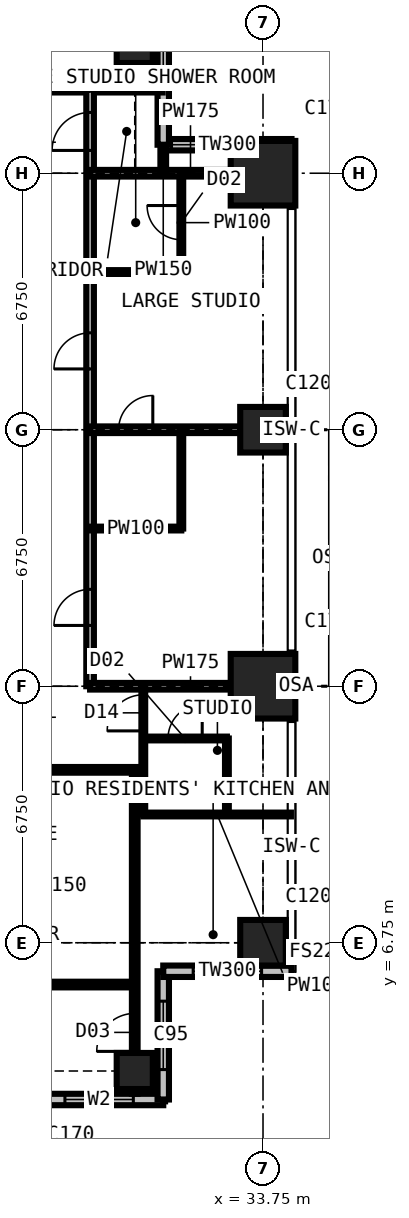
"""IFC4 building model, lengths in metres.
Left out: names, types, materials, properties, quantities, classifications, styles, units other than length and angle.
Written with IfcOpenShell. Run it as: python <this file> out.ifc"""

import sys

from ifc_helpers import new_model, si_unit, direction, frame, frame_2d, origin, origin_2d, place, context, subcontext, project, spatial, rectangle, extrude, element, fill, save


model = new_model("IFC4")
c1 = context("Model", 3, precision=1e-05, world=origin(), true_north=direction((0.0, 1.0)))
c2 = subcontext(c1, "Body", "Model", "MODEL_VIEW")
j1 = project(units=[si_unit("LENGTHUNIT", "METRE"), si_unit("PLANEANGLEUNIT", "RADIAN")], contexts=[c1])
p1 = place(None, origin())
s1 = spatial("IfcSite", under=j1, at=p1, CompositionType="ELEMENT")
p2 = place(p1, origin())
s2 = spatial("IfcBuilding", under=s1, at=p2, CompositionType="ELEMENT")
p3 = place(p2, frame((0.0, 0.0, 196.2)))
s3 = spatial("IfcBuildingStorey", under=s2, at=p3, CompositionType="ELEMENT", Elevation=196.2)
for number, where, z_axis, x_axis in (
    (1, (30.375, 3.375, 0.0), (0.0, 0.0, 1.0), (1.0, 0.0, 0.0)),
    (2, (30.375, 30.375, 0.0), (0.0, 0.0, 1.0), (1.0, 0.0, 0.0)),
):
    element("IfcColumn", number, at=place(p3, frame(where, z_axis=z_axis, x_axis=x_axis)), inside=s3, PredefinedType="COLUMN", context=c2, shape_type="SweptSolid", body=[
        extrude(rectangle(XDim=0.95, YDim=0.95, at=origin_2d()), origin(), (0.0, 0.0, 1.0), 3.6),
    ])
p4 = place(p3, frame((33.75, 6.75, 0.0), z_axis=(0.0, 0.0, 1.0), x_axis=(1.0, 0.0, 0.0)))
e3 = element("IfcColumn", 3, at=p4, inside=s3, PredefinedType="COLUMN", context=c2, shape_type="SweptSolid", body=[
    extrude(rectangle(XDim=1.2, YDim=1.2, at=origin_2d()), origin(), (0.0, 0.0, 1.0), 3.6),
])
p5 = place(p3, frame((33.75, 13.5, 0.0), z_axis=(0.0, 0.0, 1.0), x_axis=(1.0, 0.0, 0.0)))
e4 = element("IfcColumn", 4, at=p5, inside=s3, PredefinedType="COLUMN", context=c2, shape_type="SweptSolid", body=[
    extrude(rectangle(XDim=1.7, YDim=1.7, at=origin_2d()), origin(), (0.0, 0.0, 1.0), 3.6),
])
p6 = place(p3, frame((33.75, 20.25, 0.0), z_axis=(0.0, 0.0, 1.0), x_axis=(1.0, 0.0, 0.0)))
e5 = element("IfcColumn", 5, at=p6, inside=s3, PredefinedType="COLUMN", context=c2, shape_type="SweptSolid", body=[
    extrude(rectangle(XDim=1.2, YDim=1.2, at=origin_2d()), origin(), (0.0, 0.0, 1.0), 3.6),
])
p7 = place(p3, frame((33.75, 27.0, 0.0), z_axis=(0.0, 0.0, 1.0), x_axis=(1.0, 0.0, 0.0)))
e6 = element("IfcColumn", 6, at=p7, inside=s3, PredefinedType="COLUMN", context=c2, shape_type="SweptSolid", body=[
    extrude(rectangle(XDim=1.7, YDim=1.7, at=origin_2d()), origin(), (0.0, 0.0, 1.0), 3.6),
])
p8 = place(p3, frame((34.5, 27.75, 0.0), z_axis=(0.0, 0.0, 1.0), x_axis=(-1.0, 0.0, 0.0)))
e7 = element("IfcWall", 7, at=p8, inside=s3, PredefinedType="SOLIDWALL", context=c2, shape_type="SweptSolid", body=[
    extrude(rectangle(XDim=3.375, YDim=0.3, at=frame_2d((1.688, 0.0))), origin(), (0.0, 0.0, 1.0), 3.3),
])
p9 = place(p8, frame((1.657, 0.0, 0.9)))
e8 = element("IfcOpeningElement", 8, at=p9, cuts=e7, PredefinedType="OPENING", context=c2, shape_type="SweptSolid", body=[
    extrude(rectangle(XDim=1.5, YDim=1.8, at=frame_2d((0.75, 0.9))), frame((0.0, 0.16, 0.0), z_axis=(0.0, -1.0, 0.0), x_axis=(1.0, 0.0, 0.0)), (0.0, 0.0, 1.0), 0.32),
])
p10 = place(p3, frame((31.125, 27.75, 0.0), z_axis=(0.0, 0.0, 1.0), x_axis=(0.0, 1.0, 0.0)))
e9 = element("IfcWall", 9, at=p10, inside=s3, PredefinedType="SOLIDWALL", context=c2, shape_type="SweptSolid", body=[
    extrude(rectangle(XDim=3.375, YDim=0.3, at=frame_2d((1.688, 0.0))), origin(), (0.0, 0.0, 1.0), 3.3),
])
p11 = place(p10, frame((1.663, 0.0, 0.9)))
e10 = element("IfcOpeningElement", 10, at=p11, cuts=e9, PredefinedType="OPENING", context=c2, shape_type="SweptSolid", body=[
    extrude(rectangle(XDim=1.5, YDim=1.8, at=frame_2d((0.75, 0.9))), frame((0.0, 0.16, 0.0), z_axis=(0.0, -1.0, 0.0), x_axis=(1.0, 0.0, 0.0)), (0.0, 0.0, 1.0), 0.32),
])
p12 = place(p3, frame((27.75, 2.625, 0.0), z_axis=(0.0, 0.0, 1.0), x_axis=(1.0, 0.0, 0.0)))
e11 = element("IfcWall", 11, at=p12, inside=s3, PredefinedType="SOLIDWALL", context=c2, shape_type="SweptSolid", body=[
    extrude(rectangle(XDim=3.375, YDim=0.3, at=frame_2d((1.688, 0.0))), origin(), (0.0, 0.0, 1.0), 3.3),
])
p13 = place(p12, frame((0.788, 0.0, 0.6)))
e12 = element("IfcOpeningElement", 12, at=p13, cuts=e11, PredefinedType="OPENING", context=c2, shape_type="SweptSolid", body=[
    extrude(rectangle(XDim=1.8, YDim=2.1, at=frame_2d((0.9, 1.05))), frame((0.0, 0.16, 0.0), z_axis=(0.0, -1.0, 0.0), x_axis=(1.0, 0.0, 0.0)), (0.0, 0.0, 1.0), 0.32),
])
p14 = place(p3, frame((31.125, 2.625, 0.0), z_axis=(0.0, 0.0, 1.0), x_axis=(0.0, 1.0, 0.0)))
e13 = element("IfcWall", 13, at=p14, inside=s3, PredefinedType="SOLIDWALL", context=c2, shape_type="SweptSolid", body=[
    extrude(rectangle(XDim=3.375, YDim=0.3, at=frame_2d((1.688, 0.0))), origin(), (0.0, 0.0, 1.0), 3.3),
])
p15 = place(p14, frame((0.788, 0.0, 0.6)))
e14 = element("IfcOpeningElement", 14, at=p15, cuts=e13, PredefinedType="OPENING", context=c2, shape_type="SweptSolid", body=[
    extrude(rectangle(XDim=1.8, YDim=2.1, at=frame_2d((0.9, 1.05))), frame((0.0, 0.16, 0.0), z_axis=(0.0, -1.0, 0.0), x_axis=(1.0, 0.0, 0.0)), (0.0, 0.0, 1.0), 0.32),
])
p16 = place(p3, frame((31.125, 6.0, 0.0), z_axis=(0.0, 0.0, 1.0), x_axis=(1.0, 0.0, 0.0)))
e15 = element("IfcWall", 15, at=p16, inside=s3, PredefinedType="SOLIDWALL", context=c2, shape_type="SweptSolid", body=[
    extrude(rectangle(XDim=3.375, YDim=0.3, at=frame_2d((1.688, 0.0))), origin(), (0.0, 0.0, 1.0), 3.3),
])
p17 = place(p16, frame((0.788, 0.0, 0.6)))
e16 = element("IfcOpeningElement", 16, at=p17, cuts=e15, PredefinedType="OPENING", context=c2, shape_type="SweptSolid", body=[
    extrude(rectangle(XDim=1.8, YDim=2.1, at=frame_2d((0.9, 1.05))), frame((0.0, 0.16, 0.0), z_axis=(0.0, -1.0, 0.0), x_axis=(1.0, 0.0, 0.0)), (0.0, 0.0, 1.0), 0.32),
])
p18 = place(p3, frame((10.125, 11.3, 0.0), z_axis=(0.0, 0.0, 1.0), x_axis=(1.0, 0.0, 0.0)))
e17 = element("IfcWall", 17, at=p18, inside=s3, PredefinedType="PARTITIONING", context=c2, shape_type="SweptSolid", body=[
    extrude(rectangle(XDim=20.475, YDim=0.15, at=frame_2d((10.238, 0.0))), origin(), (0.0, 0.0, 1.0), 3.3),
])
p19 = place(p18, frame((8.425, 0.0, 0.0)))
e18 = element("IfcOpeningElement", 18, at=p19, cuts=e17, PredefinedType="OPENING", context=c2, shape_type="SweptSolid", body=[
    extrude(rectangle(XDim=1.0, YDim=2.2, at=frame_2d((0.5, 1.1))), frame((0.0, 0.085, 0.0), z_axis=(0.0, -1.0, 0.0), x_axis=(1.0, 0.0, 0.0)), (0.0, 0.0, 1.0), 0.17),
])
p20 = place(p18, frame((10.975, 0.0, 0.0)))
e19 = element("IfcOpeningElement", 19, at=p20, cuts=e17, PredefinedType="OPENING", context=c2, shape_type="SweptSolid", body=[
    extrude(rectangle(XDim=1.0, YDim=2.2, at=frame_2d((0.5, 1.1))), frame((0.0, 0.085, 0.0), z_axis=(0.0, -1.0, 0.0), x_axis=(1.0, 0.0, 0.0)), (0.0, 0.0, 1.0), 0.17),
])
p21 = place(p18, frame((4.875, 0.0, 0.0)))
e20 = element("IfcOpeningElement", 20, at=p21, cuts=e17, PredefinedType="OPENING", context=c2, shape_type="SweptSolid", body=[
    extrude(rectangle(XDim=0.95, YDim=2.2, at=frame_2d((0.475, 1.1))), frame((0.0, 0.085, 0.0), z_axis=(0.0, -1.0, 0.0), x_axis=(1.0, 0.0, 0.0)), (0.0, 0.0, 1.0), 0.17),
])
p22 = place(p3, frame((11.3, 29.2, 0.0), z_axis=(0.0, 0.0, 1.0), x_axis=(1.0, 0.0, 0.0)))
e21 = element("IfcWall", 21, at=p22, inside=s3, PredefinedType="PARTITIONING", context=c2, shape_type="SweptSolid", body=[
    extrude(rectangle(XDim=19.809, YDim=0.15, at=frame_2d((9.904, 0.0))), origin(), (0.0, 0.0, 1.0), 3.3),
])
p23 = place(p22, frame((12.9, 0.0, 0.0)))
e22 = element("IfcOpeningElement", 22, at=p23, cuts=e21, PredefinedType="OPENING", context=c2, shape_type="SweptSolid", body=[
    extrude(rectangle(XDim=1.0, YDim=2.2, at=frame_2d((0.5, 1.1))), frame((0.0, 0.085, 0.0), z_axis=(0.0, -1.0, 0.0), x_axis=(1.0, 0.0, 0.0)), (0.0, 0.0, 1.0), 0.17),
])
p24 = place(p22, frame((6.4, 0.0, 0.0)))
e23 = element("IfcOpeningElement", 23, at=p24, cuts=e21, PredefinedType="OPENING", context=c2, shape_type="SweptSolid", body=[
    extrude(rectangle(XDim=0.95, YDim=2.2, at=frame_2d((0.475, 1.1))), frame((0.0, 0.085, 0.0), z_axis=(0.0, -1.0, 0.0), x_axis=(1.0, 0.0, 0.0)), (0.0, 0.0, 1.0), 0.17),
])
p25 = place(p22, frame((0.6, 0.0, 0.0)))
e24 = element("IfcOpeningElement", 24, at=p25, cuts=e21, PredefinedType="OPENING", context=c2, shape_type="SweptSolid", body=[
    extrude(rectangle(XDim=1.0, YDim=2.2, at=frame_2d((0.5, 1.1))), frame((0.0, 0.085, 0.0), z_axis=(0.0, -1.0, 0.0), x_axis=(1.0, 0.0, 0.0)), (0.0, 0.0, 1.0), 0.17),
])
p26 = place(p3, frame((22.988, 5.65, 0.0), z_axis=(0.0, 0.0, 1.0), x_axis=(1.0, 0.0, 0.0)))
e25 = element("IfcWall", 25, at=p26, inside=s3, PredefinedType="PARTITIONING", context=c2, shape_type="SweptSolid", body=[
    extrude(rectangle(XDim=7.387, YDim=0.15, at=frame_2d((3.694, 0.0))), origin(), (0.0, 0.0, 1.0), 3.3),
])
p27 = place(p26, frame((2.3, 0.0, 0.0)))
e26 = element("IfcOpeningElement", 26, at=p27, cuts=e25, PredefinedType="OPENING", context=c2, shape_type="SweptSolid", body=[
    extrude(rectangle(XDim=0.95, YDim=2.2, at=frame_2d((0.475, 1.1))), frame((0.0, 0.085, 0.0), z_axis=(0.0, -1.0, 0.0), x_axis=(1.0, 0.0, 0.0)), (0.0, 0.0, 1.0), 0.17),
])
p28 = place(p3, frame((29.2, 13.5, 0.0), z_axis=(0.0, 0.0, 1.0), x_axis=(0.0, 1.0, 0.0)))
e27 = element("IfcWall", 27, at=p28, inside=s3, PredefinedType="PARTITIONING", context=c2, shape_type="SweptSolid", body=[
    extrude(rectangle(XDim=15.7, YDim=0.2, at=frame_2d((7.85, 0.0))), origin(), (0.0, 0.0, 1.0), 3.3),
])
p29 = place(p28, frame((8.35, 0.0, 0.0)))
e28 = element("IfcOpeningElement", 28, at=p29, cuts=e27, PredefinedType="OPENING", context=c2, shape_type="SweptSolid", body=[
    extrude(rectangle(XDim=0.95, YDim=2.2, at=frame_2d((0.475, 1.1))), frame((0.0, 0.11, 0.0), z_axis=(0.0, -1.0, 0.0), x_axis=(1.0, 0.0, 0.0)), (0.0, 0.0, 1.0), 0.22),
])
p30 = place(p28, frame((1.6, 0.0, 0.0)))
e29 = element("IfcOpeningElement", 29, at=p30, cuts=e27, PredefinedType="OPENING", context=c2, shape_type="SweptSolid", body=[
    extrude(rectangle(XDim=0.95, YDim=2.2, at=frame_2d((0.475, 1.1))), frame((0.0, 0.11, 0.0), z_axis=(0.0, -1.0, 0.0), x_axis=(1.0, 0.0, 0.0)), (0.0, 0.0, 1.0), 0.22),
])
p31 = place(p28, frame((14.1, 0.0, 0.0)))
e30 = element("IfcOpeningElement", 30, at=p31, cuts=e27, PredefinedType="OPENING", context=c2, shape_type="SweptSolid", body=[
    extrude(rectangle(XDim=1.0, YDim=2.2, at=frame_2d((0.5, 1.1))), frame((0.0, 0.11, 0.0), z_axis=(0.0, -1.0, 0.0), x_axis=(1.0, 0.0, 0.0)), (0.0, 0.0, 1.0), 0.22),
])
p32 = place(p3, frame((29.2, 13.5, 0.0), z_axis=(0.0, 0.0, 1.0), x_axis=(1.0, 0.0, 0.0)))
e31 = element("IfcWall", 31, at=p32, inside=s3, PredefinedType="PARTITIONING", context=c2, shape_type="SweptSolid", body=[
    extrude(rectangle(XDim=5.284, YDim=0.175, at=frame_2d((2.642, 0.0))), origin(), (0.0, 0.0, 1.0), 2.802),
])
p33 = place(p3, frame((29.2, 17.65, 0.0), z_axis=(0.0, 0.0, 1.0), x_axis=(1.0, 0.0, 0.0)))
e32 = element("IfcWall", 32, at=p33, inside=s3, PredefinedType="PARTITIONING", context=c2, shape_type="SweptSolid", body=[
    extrude(rectangle(XDim=2.4, YDim=0.1, at=frame_2d((1.2, 0.0))), origin(), (0.0, 0.0, 1.0), 3.3),
])
p34 = place(p3, frame((29.2, 20.25, 0.0), z_axis=(0.0, 0.0, 1.0), x_axis=(1.0, 0.0, 0.0)))
e33 = element("IfcWall", 33, at=p34, inside=s3, PredefinedType="PARTITIONING", context=c2, shape_type="SweptSolid", body=[
    extrude(rectangle(XDim=5.284, YDim=0.175, at=frame_2d((2.642, 0.0))), origin(), (0.0, 0.0, 1.0), 2.802),
])
p35 = place(p34, frame((0.75, 0.0, 0.0)))
e34 = element("IfcOpeningElement", 34, at=p35, cuts=e33, PredefinedType="OPENING", context=c2, shape_type="SweptSolid", body=[
    extrude(rectangle(XDim=0.9, YDim=2.2, at=frame_2d((0.45, 1.1))), frame((0.0, 0.097, 0.0), z_axis=(0.0, -1.0, 0.0), x_axis=(1.0, 0.0, 0.0)), (0.0, 0.0, 1.0), 0.195),
])
p36 = place(p3, frame((29.2, 24.4, 0.0), z_axis=(0.0, 0.0, 1.0), x_axis=(1.0, 0.0, 0.0)))
e35 = element("IfcWall", 35, at=p36, inside=s3, PredefinedType="PARTITIONING", context=c2, shape_type="SweptSolid", body=[
    extrude(rectangle(XDim=2.4, YDim=0.1, at=frame_2d((1.2, 0.0))), origin(), (0.0, 0.0, 1.0), 3.3),
])
p37 = place(p3, frame((29.2, 27.0, 0.0), z_axis=(0.0, 0.0, 1.0), x_axis=(1.0, 0.0, 0.0)))
e36 = element("IfcWall", 36, at=p37, inside=s3, PredefinedType="PARTITIONING", context=c2, shape_type="SweptSolid", body=[
    extrude(rectangle(XDim=5.284, YDim=0.175, at=frame_2d((2.642, 0.0))), origin(), (0.0, 0.0, 1.0), 2.802),
])
p38 = place(p3, frame((30.375, 2.775, 0.0), z_axis=(0.0, 0.0, 1.0), x_axis=(0.0, 1.0, 0.0)))
e37 = element("IfcWall", 37, at=p38, inside=s3, PredefinedType="PARTITIONING", context=c2, shape_type="SweptSolid", body=[
    extrude(rectangle(XDim=8.525, YDim=0.15, at=frame_2d((4.263, 0.0))), origin(), (0.0, 0.0, 1.0), 2.802),
])
p39 = place(p38, frame((1.116, 0.0, 0.0)))
e38 = element("IfcOpeningElement", 38, at=p39, cuts=e37, PredefinedType="OPENING", context=c2, shape_type="SweptSolid", body=[
    extrude(rectangle(XDim=1.0, YDim=2.2, at=frame_2d((0.5, 1.1))), frame((0.0, 0.085, 0.0), z_axis=(0.0, -1.0, 0.0), x_axis=(1.0, 0.0, 0.0)), (0.0, 0.0, 1.0), 0.17),
])
p40 = place(p3, frame((30.6, 10.125, 0.0), z_axis=(0.0, 0.0, 1.0), x_axis=(0.0, 1.0, 0.0)))
e39 = element("IfcWall", 39, at=p40, inside=s3, PredefinedType="PARTITIONING", context=c2, shape_type="SweptSolid", body=[
    extrude(rectangle(XDim=3.375, YDim=0.1, at=frame_2d((1.688, 0.0))), origin(), (0.0, 0.0, 1.0), 3.3),
])
p41 = place(p40, frame((2.2, 0.0, 0.0)))
e40 = element("IfcOpeningElement", 40, at=p41, cuts=e39, PredefinedType="OPENING", context=c2, shape_type="SweptSolid", body=[
    extrude(rectangle(XDim=0.95, YDim=2.2, at=frame_2d((0.475, 1.1))), frame((0.0, 0.06, 0.0), z_axis=(0.0, -1.0, 0.0), x_axis=(1.0, 0.0, 0.0)), (0.0, 0.0, 1.0), 0.12),
])
p42 = place(p3, frame((30.6, 10.125, 0.0), z_axis=(0.0, 0.0, 1.0), x_axis=(1.0, 0.0, 0.0)))
e41 = element("IfcWall", 41, at=p42, inside=s3, PredefinedType="PARTITIONING", context=c2, shape_type="SweptSolid", body=[
    extrude(rectangle(XDim=3.884, YDim=0.1, at=frame_2d((1.942, 0.0))), origin(), (0.0, 0.0, 1.0), 3.3),
])
p43 = place(p3, frame((30.6, 12.125, 0.0), z_axis=(0.0, 0.0, 1.0), x_axis=(1.0, 0.0, 0.0)))
e42 = element("IfcWall", 42, at=p43, inside=s3, PredefinedType="PARTITIONING", context=c2, shape_type="SweptSolid", body=[
    extrude(rectangle(XDim=2.2, YDim=0.1, at=frame_2d((1.1, 0.0))), origin(), (0.0, 0.0, 1.0), 3.3),
])
p44 = place(p43, frame((0.65, 0.0, 0.0)))
e43 = element("IfcOpeningElement", 43, at=p44, cuts=e42, PredefinedType="OPENING", context=c2, shape_type="SweptSolid", body=[
    extrude(rectangle(XDim=0.9, YDim=2.2, at=frame_2d((0.45, 1.1))), frame((0.0, 0.06, 0.0), z_axis=(0.0, -1.0, 0.0), x_axis=(1.0, 0.0, 0.0)), (0.0, 0.0, 1.0), 0.12),
])
p45 = place(p3, frame((31.125, 27.0, 0.0), z_axis=(0.0, 0.0, 1.0), x_axis=(0.0, 1.0, 0.0)))
e44 = element("IfcWall", 44, at=p45, inside=s3, PredefinedType="PARTITIONING", context=c2, shape_type="SweptSolid", body=[
    extrude(rectangle(XDim=0.734, YDim=0.15, at=frame_2d((0.367, 0.0))), origin(), (0.0, 0.0, 1.0), 3.3),
])
p46 = place(p3, frame((31.6, 17.65, 0.0), z_axis=(0.0, 0.0, 1.0), x_axis=(0.0, 1.0, 0.0)))
e45 = element("IfcWall", 45, at=p46, inside=s3, PredefinedType="PARTITIONING", context=c2, shape_type="SweptSolid", body=[
    extrude(rectangle(XDim=2.6, YDim=0.1, at=frame_2d((1.3, 0.0))), origin(), (0.0, 0.0, 1.0), 3.3),
])
p47 = place(p3, frame((31.6, 24.4, 0.0), z_axis=(0.0, 0.0, 1.0), x_axis=(0.0, 1.0, 0.0)))
e46 = element("IfcWall", 46, at=p47, inside=s3, PredefinedType="PARTITIONING", context=c2, shape_type="SweptSolid", body=[
    extrude(rectangle(XDim=2.6, YDim=0.1, at=frame_2d((1.3, 0.0))), origin(), (0.0, 0.0, 1.0), 3.3),
])
p48 = place(p47, frame((0.85, 0.0, 0.0)))
e47 = element("IfcOpeningElement", 47, at=p48, cuts=e46, PredefinedType="OPENING", context=c2, shape_type="SweptSolid", body=[
    extrude(rectangle(XDim=0.9, YDim=2.2, at=frame_2d((0.45, 1.1))), frame((0.0, 0.06, 0.0), z_axis=(0.0, -1.0, 0.0), x_axis=(1.0, 0.0, 0.0)), (0.0, 0.0, 1.0), 0.12),
])
p49 = place(p3, frame((32.8, 10.125, 0.0), z_axis=(0.0, 0.0, 1.0), x_axis=(0.0, 1.0, 0.0)))
e48 = element("IfcWall", 48, at=p49, inside=s3, PredefinedType="PARTITIONING", context=c2, shape_type="SweptSolid", body=[
    extrude(rectangle(XDim=2.0, YDim=0.1, at=frame_2d((1.0, 0.0))), origin(), (0.0, 0.0, 1.0), 3.3),
])
p50 = place(p9, origin())
e49 = element("IfcWindow", 49, at=p50, inside=s3, PartitioningType="SINGLE_PANEL", PredefinedType="WINDOW", context=c2, shape_type="SweptSolid", body=[
    extrude(rectangle(XDim=1.5, YDim=1.8, at=frame_2d((0.75, 0.9))), frame((0.0, 0.03, 0.0), z_axis=(0.0, -1.0, 0.0), x_axis=(1.0, 0.0, 0.0)), (0.0, 0.0, 1.0), 0.06),
])
fill(e8, e49)
p51 = place(p11, origin())
e50 = element("IfcWindow", 50, at=p51, inside=s3, PartitioningType="SINGLE_PANEL", PredefinedType="WINDOW", context=c2, shape_type="SweptSolid", body=[
    extrude(rectangle(XDim=1.5, YDim=1.8, at=frame_2d((0.75, 0.9))), frame((0.0, 0.03, 0.0), z_axis=(0.0, -1.0, 0.0), x_axis=(1.0, 0.0, 0.0)), (0.0, 0.0, 1.0), 0.06),
])
fill(e10, e50)
p52 = place(p13, origin())
e51 = element("IfcWindow", 51, at=p52, inside=s3, PartitioningType="SINGLE_PANEL", PredefinedType="WINDOW", context=c2, shape_type="SweptSolid", body=[
    extrude(rectangle(XDim=1.8, YDim=2.1, at=frame_2d((0.9, 1.05))), frame((0.0, 0.03, 0.0), z_axis=(0.0, -1.0, 0.0), x_axis=(1.0, 0.0, 0.0)), (0.0, 0.0, 1.0), 0.06),
])
fill(e12, e51)
p53 = place(p15, origin())
e52 = element("IfcWindow", 52, at=p53, inside=s3, PartitioningType="SINGLE_PANEL", PredefinedType="WINDOW", context=c2, shape_type="SweptSolid", body=[
    extrude(rectangle(XDim=1.8, YDim=2.1, at=frame_2d((0.9, 1.05))), frame((0.0, 0.03, 0.0), z_axis=(0.0, -1.0, 0.0), x_axis=(1.0, 0.0, 0.0)), (0.0, 0.0, 1.0), 0.06),
])
fill(e14, e52)
p54 = place(p17, origin())
e53 = element("IfcWindow", 53, at=p54, inside=s3, PartitioningType="SINGLE_PANEL", PredefinedType="WINDOW", context=c2, shape_type="SweptSolid", body=[
    extrude(rectangle(XDim=1.8, YDim=2.1, at=frame_2d((0.9, 1.05))), frame((0.0, 0.03, 0.0), z_axis=(0.0, -1.0, 0.0), x_axis=(1.0, 0.0, 0.0)), (0.0, 0.0, 1.0), 0.06),
])
fill(e16, e53)
p55 = place(p39, origin())
e54 = element("IfcDoor", 54, at=p55, inside=s3, OperationType="SINGLE_SWING_LEFT", PredefinedType="DOOR", context=c2, shape_type="SweptSolid", body=[
    extrude(rectangle(XDim=1.0, YDim=2.2, at=frame_2d((0.5, 1.1))), frame((0.0, 0.025, 0.0), z_axis=(0.0, -1.0, 0.0), x_axis=(1.0, 0.0, 0.0)), (0.0, 0.0, 1.0), 0.05),
])
fill(e38, e54)
p56 = place(p29, origin())
e55 = element("IfcDoor", 55, at=p56, inside=s3, OperationType="SINGLE_SWING_LEFT", PredefinedType="DOOR", context=c2, shape_type="SweptSolid", body=[
    extrude(rectangle(XDim=0.95, YDim=2.2, at=frame_2d((0.475, 1.1))), frame((0.0, 0.025, 0.0), z_axis=(0.0, -1.0, 0.0), x_axis=(1.0, 0.0, 0.0)), (0.0, 0.0, 1.0), 0.05),
])
fill(e28, e55)
p57 = place(p48, origin())
e56 = element("IfcDoor", 56, at=p57, inside=s3, OperationType="SINGLE_SWING_RIGHT", PredefinedType="DOOR", context=c2, shape_type="SweptSolid", body=[
    extrude(rectangle(XDim=0.9, YDim=2.2, at=frame_2d((0.45, 1.1))), frame((0.0, 0.025, 0.0), z_axis=(0.0, -1.0, 0.0), x_axis=(1.0, 0.0, 0.0)), (0.0, 0.0, 1.0), 0.05),
])
fill(e47, e56)
p58 = place(p30, origin())
e57 = element("IfcDoor", 57, at=p58, inside=s3, OperationType="SINGLE_SWING_LEFT", PredefinedType="DOOR", context=c2, shape_type="SweptSolid", body=[
    extrude(rectangle(XDim=0.95, YDim=2.2, at=frame_2d((0.475, 1.1))), frame((0.0, 0.025, 0.0), z_axis=(0.0, -1.0, 0.0), x_axis=(1.0, 0.0, 0.0)), (0.0, 0.0, 1.0), 0.05),
])
fill(e29, e57)
p59 = place(p35, origin())
e58 = element("IfcDoor", 58, at=p59, inside=s3, OperationType="SINGLE_SWING_RIGHT", PredefinedType="DOOR", context=c2, shape_type="SweptSolid", body=[
    extrude(rectangle(XDim=0.9, YDim=2.2, at=frame_2d((0.45, 1.1))), frame((0.0, 0.025, 0.0), z_axis=(0.0, -1.0, 0.0), x_axis=(1.0, 0.0, 0.0)), (0.0, 0.0, 1.0), 0.05),
])
fill(e34, e58)
p60 = place(p41, origin())
e59 = element("IfcDoor", 59, at=p60, inside=s3, OperationType="SINGLE_SWING_LEFT", PredefinedType="DOOR", context=c2, shape_type="SweptSolid", body=[
    extrude(rectangle(XDim=0.95, YDim=2.2, at=frame_2d((0.475, 1.1))), frame((0.0, 0.025, 0.0), z_axis=(0.0, -1.0, 0.0), x_axis=(1.0, 0.0, 0.0)), (0.0, 0.0, 1.0), 0.05),
])
fill(e40, e59)
p61 = place(p44, origin())
e60 = element("IfcDoor", 60, at=p61, inside=s3, OperationType="SINGLE_SWING_RIGHT", PredefinedType="DOOR", context=c2, shape_type="SweptSolid", body=[
    extrude(rectangle(XDim=0.9, YDim=2.2, at=frame_2d((0.45, 1.1))), frame((0.0, 0.025, 0.0), z_axis=(0.0, -1.0, 0.0), x_axis=(1.0, 0.0, 0.0)), (0.0, 0.0, 1.0), 0.05),
])
fill(e43, e60)
p62 = place(p31, origin())
e61 = element("IfcDoor", 61, at=p62, inside=s3, OperationType="SINGLE_SWING_LEFT", PredefinedType="DOOR", context=c2, shape_type="SweptSolid", body=[
    extrude(rectangle(XDim=1.0, YDim=2.2, at=frame_2d((0.5, 1.1))), frame((0.0, 0.025, 0.0), z_axis=(0.0, -1.0, 0.0), x_axis=(1.0, 0.0, 0.0)), (0.0, 0.0, 1.0), 0.05),
])
fill(e30, e61)
save(model, sys.argv[1])
